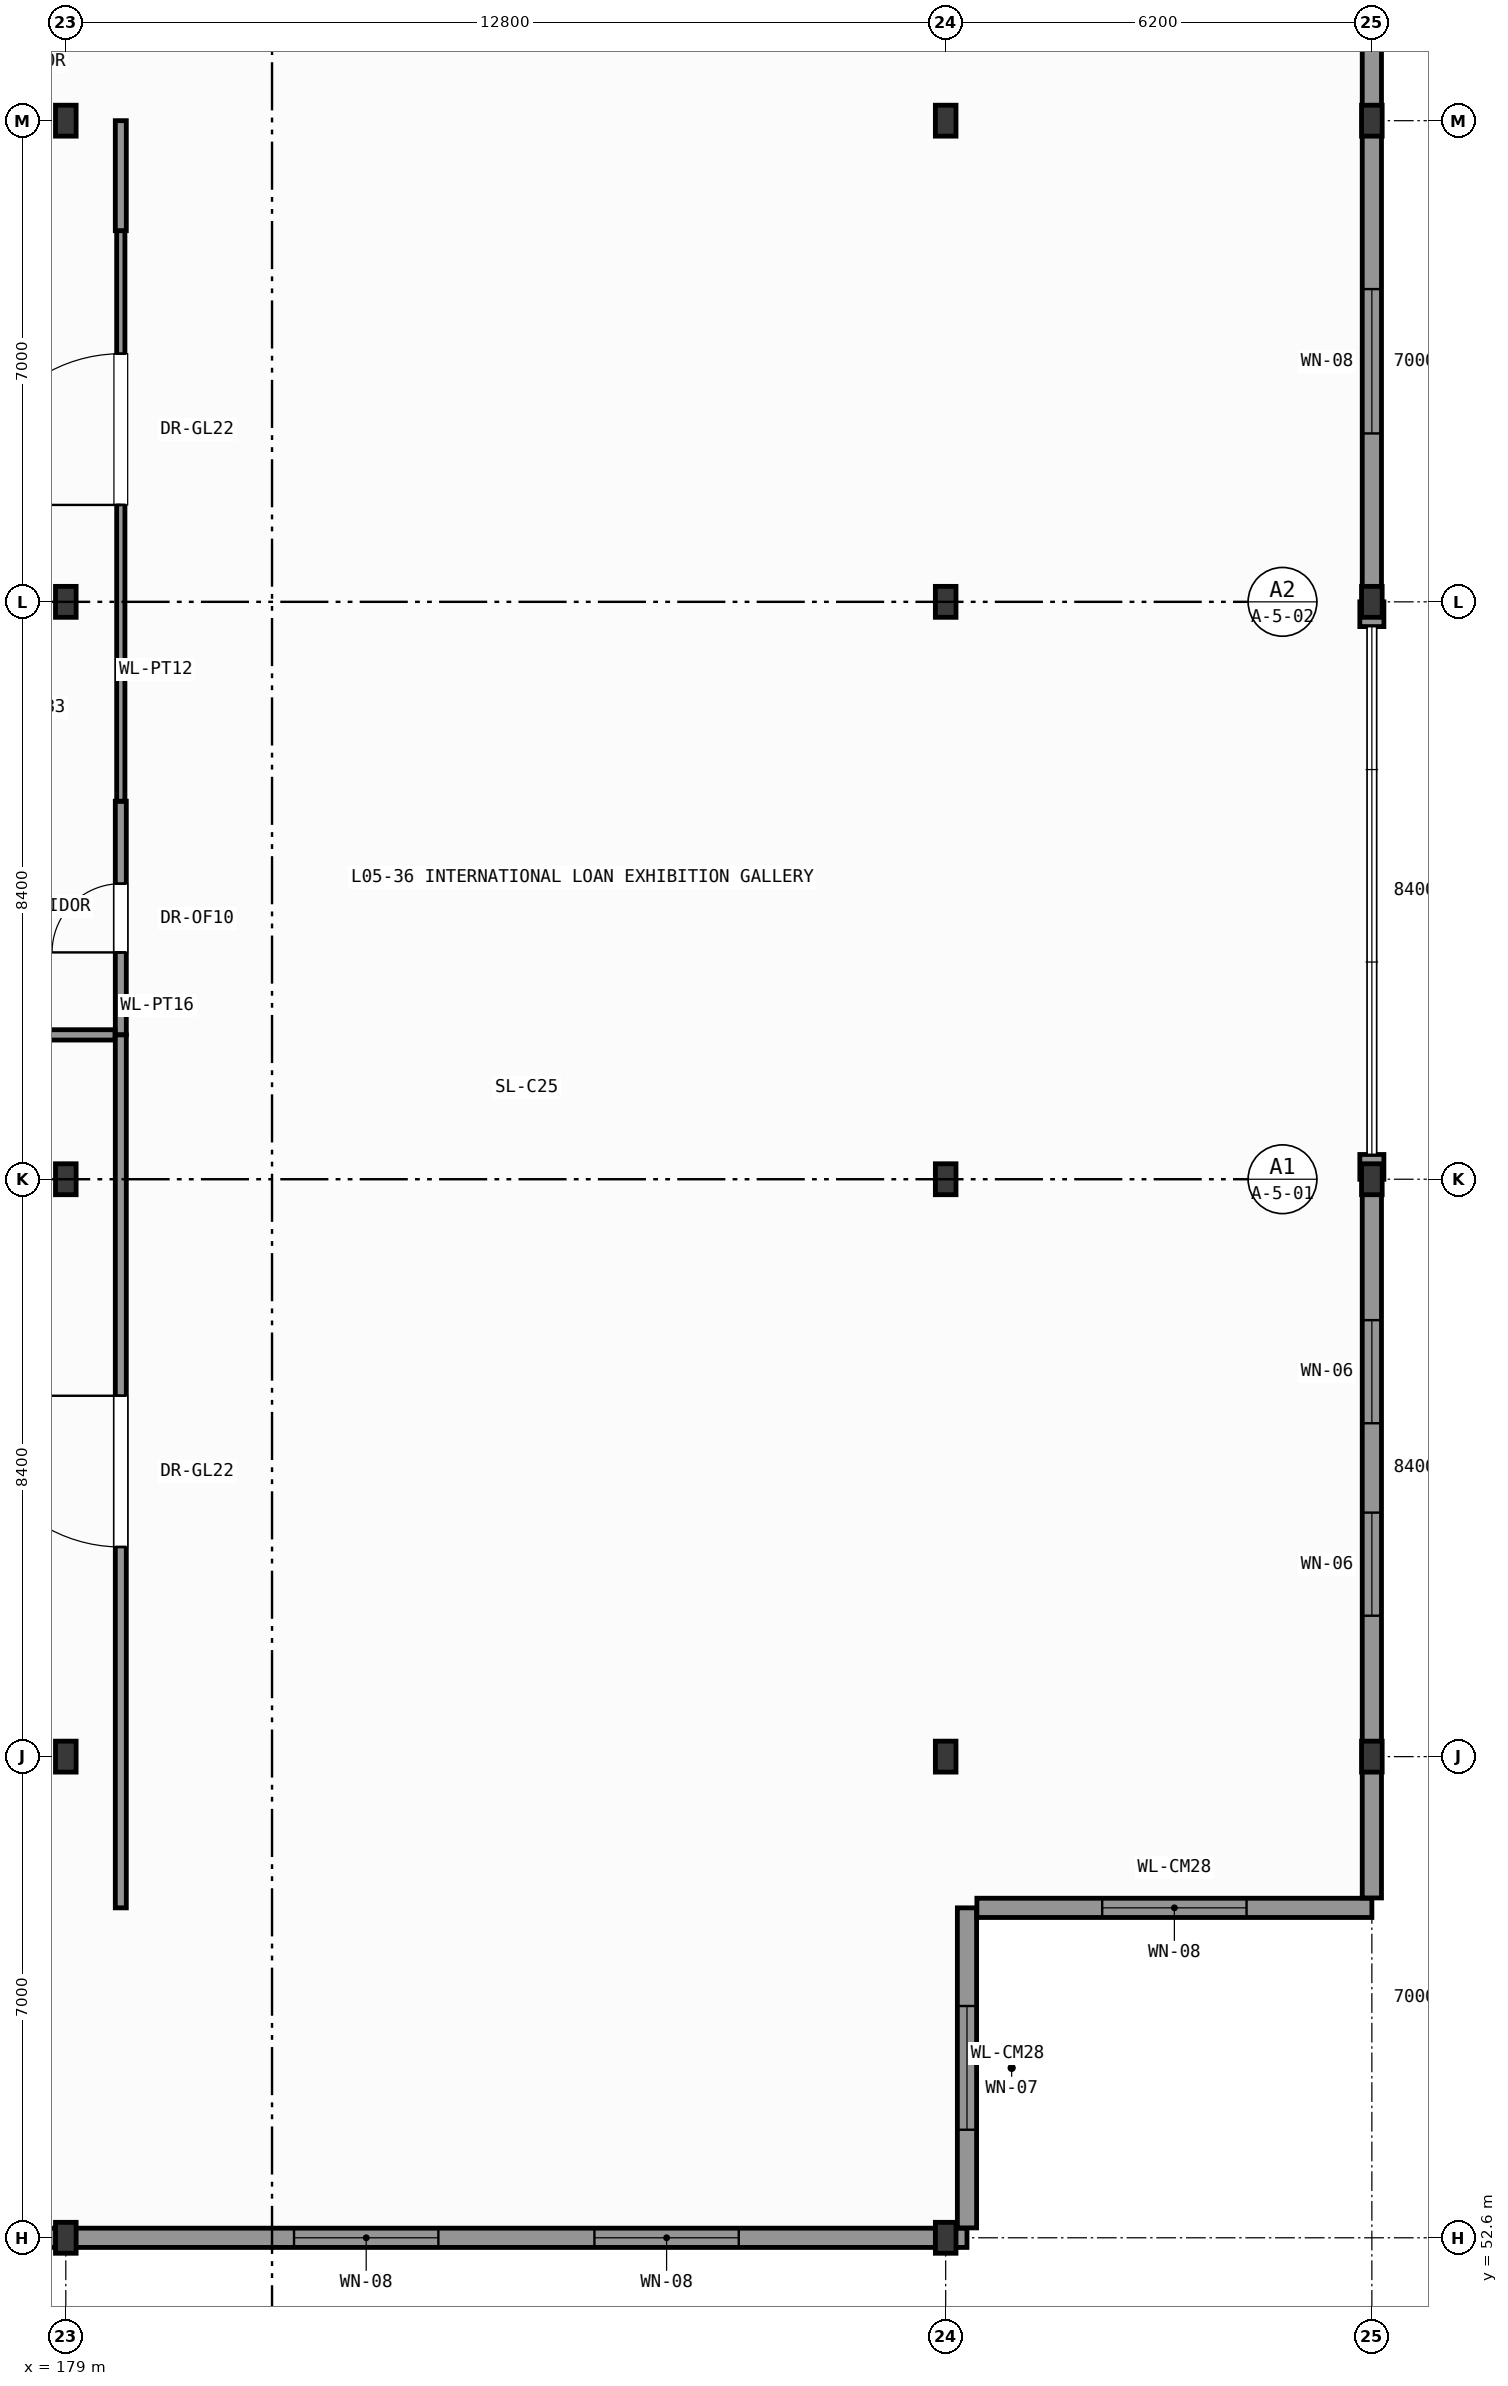
"""IFC4 building model, lengths in metres.
Left out: names, types, materials, properties, quantities, classifications, styles, units other than length and angle.
Written with IfcOpenShell. Run it as: python <this file> out.ifc"""

import sys

from ifc_helpers import new_model, si_unit, direction, frame, frame_2d, origin, origin_2d, place, context, subcontext, project, spatial, rectangle, i_section, extrude, element, fill, save


model = new_model("IFC4")
c1 = context("Model", 3, precision=1e-05, world=origin(), true_north=direction((0.0, 1.0)))
c2 = subcontext(c1, "Body", "Model", "MODEL_VIEW")
j1 = project(units=[si_unit("LENGTHUNIT", "METRE"), si_unit("PLANEANGLEUNIT", "RADIAN")], contexts=[c1])
p1 = place(None, origin())
s1 = spatial("IfcSite", under=j1, at=p1, CompositionType="ELEMENT")
p2 = place(p1, origin())
s2 = spatial("IfcBuilding", under=s1, at=p2, CompositionType="ELEMENT")
p3 = place(p2, frame((0.0, 0.0, 22.2)))
s3 = spatial("IfcBuildingStorey", under=s2, at=p3, CompositionType="ELEMENT", Elevation=22.2)
for number, where, z_axis, x_axis in (
    (1, (179.0, 52.6, 0.0), (0.0, 0.0, 1.0), (1.0, 0.0, 0.0)),
    (2, (179.0, 59.6, 0.0), (0.0, 0.0, 1.0), (1.0, 0.0, 0.0)),
    (3, (179.0, 68.0, 0.0), (0.0, 0.0, 1.0), (1.0, 0.0, 0.0)),
    (4, (179.0, 76.4, 0.0), (0.0, 0.0, 1.0), (1.0, 0.0, 0.0)),
    (5, (179.0, 83.4, 0.0), (0.0, 0.0, 1.0), (1.0, 0.0, 0.0)),
    (6, (191.8, 52.6, 0.0), (0.0, 0.0, 1.0), (1.0, 0.0, 0.0)),
    (7, (191.8, 59.6, 0.0), (0.0, 0.0, 1.0), (1.0, 0.0, 0.0)),
    (8, (191.8, 68.0, 0.0), (0.0, 0.0, 1.0), (1.0, 0.0, 0.0)),
    (9, (191.8, 76.4, 0.0), (0.0, 0.0, 1.0), (1.0, 0.0, 0.0)),
    (10, (191.8, 83.4, 0.0), (0.0, 0.0, 1.0), (1.0, 0.0, 0.0)),
    (11, (198.0, 59.6, 0.0), (0.0, 0.0, 1.0), (1.0, 0.0, 0.0)),
    (12, (198.0, 68.0, 0.0), (0.0, 0.0, 1.0), (1.0, 0.0, 0.0)),
    (13, (198.0, 76.4, 0.0), (0.0, 0.0, 1.0), (1.0, 0.0, 0.0)),
    (14, (198.0, 83.4, 0.0), (0.0, 0.0, 1.0), (1.0, 0.0, 0.0)),
):
    element("IfcColumn", number, at=place(p3, frame(where, z_axis=z_axis, x_axis=x_axis)), inside=s3, PredefinedType="COLUMN", context=c2, shape_type="SweptSolid", body=[
        extrude(i_section(OverallWidth=0.3, OverallDepth=0.45, WebThickness=0.014, FlangeThickness=0.026, FilletRadius=0.027, at=origin_2d()), origin(), (0.0, 0.0, 1.0), 4.2),
    ])
p4 = place(p3, frame((179.0, 52.6, 0.0), z_axis=(0.0, 0.0, 1.0), x_axis=(-1.0, 0.0, 0.0)))
e15 = element("IfcWall", 15, at=p4, inside=s3, PredefinedType="SOLIDWALL", context=c2, shape_type="SweptSolid", body=[
    extrude(rectangle(XDim=11.856, YDim=0.28, at=frame_2d((5.928, 0.0))), origin(), (0.0, 0.0, 1.0), 3.415),
])
p5 = place(p4, frame((3.202, 0.0, 0.95)))
e16 = element("IfcOpeningElement", 16, at=p5, cuts=e15, PredefinedType="OPENING", context=c2, shape_type="SweptSolid", body=[
    extrude(rectangle(XDim=1.5, YDim=2.06, at=frame_2d((0.75, 1.03))), frame((0.0, 0.15, 0.0), z_axis=(0.0, -1.0, 0.0), x_axis=(1.0, 0.0, 0.0)), (0.0, 0.0, 1.0), 0.3),
])
p6 = place(p4, frame((7.154, 0.0, 0.95)))
e17 = element("IfcOpeningElement", 17, at=p6, cuts=e15, PredefinedType="OPENING", context=c2, shape_type="SweptSolid", body=[
    extrude(rectangle(XDim=1.5, YDim=2.06, at=frame_2d((0.75, 1.03))), frame((0.0, 0.15, 0.0), z_axis=(0.0, -1.0, 0.0), x_axis=(1.0, 0.0, 0.0)), (0.0, 0.0, 1.0), 0.3),
])
p7 = place(p3, frame((192.11, 52.6, 0.0), z_axis=(0.0, 0.0, 1.0), x_axis=(-1.0, 0.0, 0.0)))
e18 = element("IfcWall", 18, at=p7, inside=s3, PredefinedType="SOLIDWALL", context=c2, shape_type="SweptSolid", body=[
    extrude(rectangle(XDim=13.11, YDim=0.28, at=frame_2d((6.555, 0.0))), origin(), (0.0, 0.0, 1.0), 3.415),
])
p8 = place(p7, frame((3.32, 0.0, 0.95)))
e19 = element("IfcOpeningElement", 19, at=p8, cuts=e18, PredefinedType="OPENING", context=c2, shape_type="SweptSolid", body=[
    extrude(rectangle(XDim=2.1, YDim=2.06, at=frame_2d((1.05, 1.03))), frame((0.0, 0.15, 0.0), z_axis=(0.0, -1.0, 0.0), x_axis=(1.0, 0.0, 0.0)), (0.0, 0.0, 1.0), 0.3),
])
p9 = place(p7, frame((7.69, 0.0, 0.95)))
e20 = element("IfcOpeningElement", 20, at=p9, cuts=e18, PredefinedType="OPENING", context=c2, shape_type="SweptSolid", body=[
    extrude(rectangle(XDim=2.1, YDim=2.06, at=frame_2d((1.05, 1.03))), frame((0.0, 0.15, 0.0), z_axis=(0.0, -1.0, 0.0), x_axis=(1.0, 0.0, 0.0)), (0.0, 0.0, 1.0), 0.3),
])
p10 = place(p3, frame((192.11, 57.4, 0.0), z_axis=(0.0, 0.0, 1.0), x_axis=(0.0, -1.0, 0.0)))
e21 = element("IfcWall", 21, at=p10, inside=s3, PredefinedType="SOLIDWALL", context=c2, shape_type="SweptSolid", body=[
    extrude(rectangle(XDim=4.656, YDim=0.28, at=frame_2d((2.328, 0.0))), origin(), (0.0, 0.0, 1.0), 3.675),
])
p11 = place(p10, frame((1.428, 0.0, 0.95)))
e22 = element("IfcOpeningElement", 22, at=p11, cuts=e21, PredefinedType="OPENING", context=c2, shape_type="SweptSolid", body=[
    extrude(rectangle(XDim=1.8, YDim=2.33, at=frame_2d((0.9, 1.165))), frame((0.0, 0.15, 0.0), z_axis=(0.0, -1.0, 0.0), x_axis=(1.0, 0.0, 0.0)), (0.0, 0.0, 1.0), 0.3),
])
p12 = place(p3, frame((198.0, 57.4, 0.0), z_axis=(0.0, 0.0, 1.0), x_axis=(-1.0, 0.0, 0.0)))
e23 = element("IfcWall", 23, at=p12, inside=s3, PredefinedType="SOLIDWALL", context=c2, shape_type="SweptSolid", body=[
    extrude(rectangle(XDim=5.746, YDim=0.28, at=frame_2d((2.873, 0.0))), origin(), (0.0, 0.0, 1.0), 3.98),
])
p13 = place(p12, frame((1.823, 0.0, 0.95)))
e24 = element("IfcOpeningElement", 24, at=p13, cuts=e23, PredefinedType="OPENING", context=c2, shape_type="SweptSolid", body=[
    extrude(rectangle(XDim=2.1, YDim=2.63, at=frame_2d((1.05, 1.315))), frame((0.0, 0.15, 0.0), z_axis=(0.0, -1.0, 0.0), x_axis=(1.0, 0.0, 0.0)), (0.0, 0.0, 1.0), 0.3),
])
p14 = place(p3, frame((198.0, 59.6, 0.0), z_axis=(0.0, 0.0, 1.0), x_axis=(0.0, -1.0, 0.0)))
e25 = element("IfcWall", 25, at=p14, inside=s3, PredefinedType="SOLIDWALL", context=c2, shape_type="SweptSolid", body=[
    extrude(rectangle(XDim=2.056, YDim=0.28, at=frame_2d((1.028, 0.0))), origin(), (0.0, 0.0, 1.0), 3.98),
])
p15 = place(p3, frame((198.0, 68.0, 0.0), z_axis=(0.0, 0.0, 1.0), x_axis=(0.0, -1.0, 0.0)))
e26 = element("IfcWall", 26, at=p15, inside=s3, PredefinedType="SOLIDWALL", context=c2, shape_type="SweptSolid", body=[
    extrude(rectangle(XDim=8.4, YDim=0.28, at=frame_2d((4.2, 0.0))), origin(), (0.0, 0.0, 1.0), 3.525),
])
p16 = place(p15, frame((2.05, 0.0, 0.95)))
e27 = element("IfcOpeningElement", 27, at=p16, cuts=e26, PredefinedType="OPENING", context=c2, shape_type="SweptSolid", body=[
    extrude(rectangle(XDim=1.5, YDim=2.18, at=frame_2d((0.75, 1.09))), frame((0.0, 0.15, 0.0), z_axis=(0.0, -1.0, 0.0), x_axis=(1.0, 0.0, 0.0)), (0.0, 0.0, 1.0), 0.3),
])
p17 = place(p15, frame((4.85, 0.0, 0.95)))
e28 = element("IfcOpeningElement", 28, at=p17, cuts=e26, PredefinedType="OPENING", context=c2, shape_type="SweptSolid", body=[
    extrude(rectangle(XDim=1.5, YDim=2.18, at=frame_2d((0.75, 1.09))), frame((0.0, 0.15, 0.0), z_axis=(0.0, -1.0, 0.0), x_axis=(1.0, 0.0, 0.0)), (0.0, 0.0, 1.0), 0.3),
])
p18 = place(p3, frame((198.0, 68.0, 0.0), z_axis=(0.0, 0.0, 1.0), x_axis=(0.0, 1.0, 0.0)))
e29 = element("IfcWall", 29, at=p18, inside=s3, PredefinedType="SOLIDWALL", context=c2, shape_type="SweptSolid", body=[
    extrude(rectangle(XDim=0.36, YDim=0.35, at=frame_2d((0.18, 0.0))), origin(), (0.0, 0.0, 1.0), 3.525),
])
p19 = place(p3, frame((198.0, 76.04, 0.0), z_axis=(0.0, 0.0, 1.0), x_axis=(0.0, 1.0, 0.0)))
e30 = element("IfcWall", 30, at=p19, inside=s3, PredefinedType="SOLIDWALL", context=c2, shape_type="SweptSolid", body=[
    extrude(rectangle(XDim=0.36, YDim=0.35, at=frame_2d((0.18, 0.0))), origin(), (0.0, 0.0, 1.0), 3.525),
])
p20 = place(p3, frame((198.0, 83.4, 0.0), z_axis=(0.0, 0.0, 1.0), x_axis=(0.0, -1.0, 0.0)))
e31 = element("IfcWall", 31, at=p20, inside=s3, PredefinedType="SOLIDWALL", context=c2, shape_type="SweptSolid", body=[
    extrude(rectangle(XDim=7.0, YDim=0.28, at=frame_2d((3.5, 0.0))), origin(), (0.0, 0.0, 1.0), 3.675),
])
p21 = place(p20, frame((2.45, 0.0, 0.95)))
e32 = element("IfcOpeningElement", 32, at=p21, cuts=e31, PredefinedType="OPENING", context=c2, shape_type="SweptSolid", body=[
    extrude(rectangle(XDim=2.1, YDim=2.33, at=frame_2d((1.05, 1.165))), frame((0.0, 0.15, 0.0), z_axis=(0.0, -1.0, 0.0), x_axis=(1.0, 0.0, 0.0)), (0.0, 0.0, 1.0), 0.3),
])
p22 = place(p3, frame((198.0, 90.4, 0.0), z_axis=(0.0, 0.0, 1.0), x_axis=(0.0, -1.0, 0.0)))
e33 = element("IfcWall", 33, at=p22, inside=s3, PredefinedType="SOLIDWALL", context=c2, shape_type="SweptSolid", body=[
    extrude(rectangle(XDim=7.0, YDim=0.28, at=frame_2d((3.5, 0.0))), origin(), (0.0, 0.0, 1.0), 3.675),
])
p23 = place(p22, frame((1.583, 0.0, 0.95)))
e34 = element("IfcOpeningElement", 34, at=p23, cuts=e33, PredefinedType="OPENING", context=c2, shape_type="SweptSolid", body=[
    extrude(rectangle(XDim=1.5, YDim=2.33, at=frame_2d((0.75, 1.165))), frame((0.0, 0.15, 0.0), z_axis=(0.0, -1.0, 0.0), x_axis=(1.0, 0.0, 0.0)), (0.0, 0.0, 1.0), 0.3),
])
p24 = place(p22, frame((3.917, 0.0, 0.95)))
e35 = element("IfcOpeningElement", 35, at=p24, cuts=e33, PredefinedType="OPENING", context=c2, shape_type="SweptSolid", body=[
    extrude(rectangle(XDim=1.5, YDim=2.33, at=frame_2d((0.75, 1.165))), frame((0.0, 0.15, 0.0), z_axis=(0.0, -1.0, 0.0), x_axis=(1.0, 0.0, 0.0)), (0.0, 0.0, 1.0), 0.3),
])
p25 = place(p3, frame((179.8, 70.1, 0.0), z_axis=(0.0, 0.0, 1.0), x_axis=(0.0, 1.0, 0.0)))
e36 = element("IfcWall", 36, at=p25, inside=s3, PredefinedType="PARTITIONING", context=c2, shape_type="SweptSolid", body=[
    extrude(rectangle(XDim=3.4, YDim=0.16, at=frame_2d((1.7, 0.0))), origin(), (0.0, 0.0, 1.0), 3.98),
])
p26 = place(p25, frame((1.2, 0.0, 0.0)))
e37 = element("IfcOpeningElement", 37, at=p26, cuts=e36, PredefinedType="OPENING", context=c2, shape_type="SweptSolid", body=[
    extrude(rectangle(XDim=1.0, YDim=2.15, at=frame_2d((0.5, 1.075))), frame((0.0, 0.09, 0.0), z_axis=(0.0, -1.0, 0.0), x_axis=(1.0, 0.0, 0.0)), (0.0, 0.0, 1.0), 0.18),
])
p27 = place(p3, frame((170.464, 70.1, 0.0), z_axis=(0.0, 0.0, 1.0), x_axis=(1.0, 0.0, 0.0)))
e38 = element("IfcWall", 38, at=p27, inside=s3, PredefinedType="PARTITIONING", context=c2, shape_type="SweptSolid", body=[
    extrude(rectangle(XDim=9.252, YDim=0.15, at=frame_2d((4.626, 0.0))), origin(), (0.0, 0.0, 1.0), 3.98),
])
p28 = place(p27, frame((3.526, 0.0, 0.0)))
e39 = element("IfcOpeningElement", 39, at=p28, cuts=e38, PredefinedType="OPENING", context=c2, shape_type="SweptSolid", body=[
    extrude(rectangle(XDim=2.2, YDim=2.6, at=frame_2d((1.1, 1.3))), frame((0.0, 0.085, 0.0), z_axis=(0.0, -1.0, 0.0), x_axis=(1.0, 0.0, 0.0)), (0.0, 0.0, 1.0), 0.17),
])
p29 = place(p3, frame((179.8, 73.5, 0.0), z_axis=(0.0, 0.0, 1.0), x_axis=(0.0, 1.0, 0.0)))
e40 = element("IfcWall", 40, at=p29, inside=s3, PredefinedType="PARTITIONING", context=c2, shape_type="SweptSolid", body=[
    extrude(rectangle(XDim=8.3, YDim=0.12, at=frame_2d((4.15, 0.0))), origin(), (0.0, 0.0, 1.0), 3.98),
])
p30 = place(p29, frame((4.31, 0.0, 0.0)))
e41 = element("IfcOpeningElement", 41, at=p30, cuts=e40, PredefinedType="OPENING", context=c2, shape_type="SweptSolid", body=[
    extrude(rectangle(XDim=2.2, YDim=2.6, at=frame_2d((1.1, 1.3))), frame((0.0, 0.07, 0.0), z_axis=(0.0, -1.0, 0.0), x_axis=(1.0, 0.0, 0.0)), (0.0, 0.0, 1.0), 0.14),
])
p31 = place(p3, frame((179.8, 81.8, 0.0), z_axis=(0.0, 0.0, 1.0), x_axis=(0.0, 1.0, 0.0)))
e42 = element("IfcWall", 42, at=p31, inside=s3, PredefinedType="PARTITIONING", context=c2, shape_type="SweptSolid", body=[
    extrude(rectangle(XDim=1.6, YDim=0.16, at=frame_2d((0.8, 0.0))), origin(), (0.0, 0.0, 1.0), 3.98),
])
p32 = place(p3, frame((179.8, 57.4, 0.0), z_axis=(0.0, 0.0, 1.0), x_axis=(0.0, 1.0, 0.0)))
e43 = element("IfcWall", 43, at=p32, inside=s3, PredefinedType="PARTITIONING", context=c2, shape_type="SweptSolid", body=[
    extrude(rectangle(XDim=12.7, YDim=0.16, at=frame_2d((6.35, 0.0))), origin(), (0.0, 0.0, 1.0), 3.98),
])
p33 = place(p32, frame((5.25, 0.0, 0.0)))
e44 = element("IfcOpeningElement", 44, at=p33, cuts=e43, PredefinedType="OPENING", context=c2, shape_type="SweptSolid", body=[
    extrude(rectangle(XDim=2.2, YDim=2.6, at=frame_2d((1.1, 1.3))), frame((0.0, 0.09, 0.0), z_axis=(0.0, -1.0, 0.0), x_axis=(1.0, 0.0, 0.0)), (0.0, 0.0, 1.0), 0.18),
])
p34 = place(p8, origin())
e45 = element("IfcWindow", 45, at=p34, inside=s3, PartitioningType="SINGLE_PANEL", PredefinedType="WINDOW", context=c2, shape_type="SweptSolid", body=[
    extrude(rectangle(XDim=2.1, YDim=2.06, at=frame_2d((1.05, 1.03))), frame((0.0, 0.03, 0.0), z_axis=(0.0, -1.0, 0.0), x_axis=(1.0, 0.0, 0.0)), (0.0, 0.0, 1.0), 0.06),
])
fill(e19, e45)
p35 = place(p9, origin())
e46 = element("IfcWindow", 46, at=p35, inside=s3, PartitioningType="SINGLE_PANEL", PredefinedType="WINDOW", context=c2, shape_type="SweptSolid", body=[
    extrude(rectangle(XDim=2.1, YDim=2.06, at=frame_2d((1.05, 1.03))), frame((0.0, 0.03, 0.0), z_axis=(0.0, -1.0, 0.0), x_axis=(1.0, 0.0, 0.0)), (0.0, 0.0, 1.0), 0.06),
])
fill(e20, e46)
p36 = place(p11, origin())
e47 = element("IfcWindow", 47, at=p36, inside=s3, PartitioningType="SINGLE_PANEL", PredefinedType="WINDOW", context=c2, shape_type="SweptSolid", body=[
    extrude(rectangle(XDim=1.8, YDim=2.33, at=frame_2d((0.9, 1.165))), frame((0.0, 0.03, 0.0), z_axis=(0.0, -1.0, 0.0), x_axis=(1.0, 0.0, 0.0)), (0.0, 0.0, 1.0), 0.06),
])
fill(e22, e47)
p37 = place(p13, origin())
e48 = element("IfcWindow", 48, at=p37, inside=s3, PartitioningType="SINGLE_PANEL", PredefinedType="WINDOW", context=c2, shape_type="SweptSolid", body=[
    extrude(rectangle(XDim=2.1, YDim=2.63, at=frame_2d((1.05, 1.315))), frame((0.0, 0.03, 0.0), z_axis=(0.0, -1.0, 0.0), x_axis=(1.0, 0.0, 0.0)), (0.0, 0.0, 1.0), 0.06),
])
fill(e24, e48)
p38 = place(p16, origin())
e49 = element("IfcWindow", 49, at=p38, inside=s3, PartitioningType="SINGLE_PANEL", PredefinedType="WINDOW", context=c2, shape_type="SweptSolid", body=[
    extrude(rectangle(XDim=1.5, YDim=2.18, at=frame_2d((0.75, 1.09))), frame((0.0, 0.03, 0.0), z_axis=(0.0, -1.0, 0.0), x_axis=(1.0, 0.0, 0.0)), (0.0, 0.0, 1.0), 0.06),
])
fill(e27, e49)
p39 = place(p17, origin())
e50 = element("IfcWindow", 50, at=p39, inside=s3, PartitioningType="SINGLE_PANEL", PredefinedType="WINDOW", context=c2, shape_type="SweptSolid", body=[
    extrude(rectangle(XDim=1.5, YDim=2.18, at=frame_2d((0.75, 1.09))), frame((0.0, 0.03, 0.0), z_axis=(0.0, -1.0, 0.0), x_axis=(1.0, 0.0, 0.0)), (0.0, 0.0, 1.0), 0.06),
])
fill(e28, e50)
p40 = place(p21, origin())
e51 = element("IfcWindow", 51, at=p40, inside=s3, PartitioningType="SINGLE_PANEL", PredefinedType="WINDOW", context=c2, shape_type="SweptSolid", body=[
    extrude(rectangle(XDim=2.1, YDim=2.33, at=frame_2d((1.05, 1.165))), frame((0.0, 0.03, 0.0), z_axis=(0.0, -1.0, 0.0), x_axis=(1.0, 0.0, 0.0)), (0.0, 0.0, 1.0), 0.06),
])
fill(e32, e51)
p41 = place(p26, origin())
e52 = element("IfcDoor", 52, at=p41, inside=s3, OperationType="SINGLE_SWING_LEFT", PredefinedType="DOOR", context=c2, shape_type="SweptSolid", body=[
    extrude(rectangle(XDim=1.0, YDim=2.15, at=frame_2d((0.5, 1.075))), frame((0.0, 0.025, 0.0), z_axis=(0.0, -1.0, 0.0), x_axis=(1.0, 0.0, 0.0)), (0.0, 0.0, 1.0), 0.05),
])
fill(e37, e52)
p42 = place(p30, origin())
e53 = element("IfcDoor", 53, at=p42, inside=s3, OperationType="SINGLE_SWING_LEFT", PredefinedType="DOOR", context=c2, shape_type="SweptSolid", body=[
    extrude(rectangle(XDim=2.2, YDim=2.6, at=frame_2d((1.1, 1.3))), frame((0.0, 0.025, 0.0), z_axis=(0.0, -1.0, 0.0), x_axis=(1.0, 0.0, 0.0)), (0.0, 0.0, 1.0), 0.05),
])
fill(e41, e53)
p43 = place(p33, origin())
e54 = element("IfcDoor", 54, at=p43, inside=s3, OperationType="SINGLE_SWING_RIGHT", PredefinedType="DOOR", context=c2, shape_type="SweptSolid", body=[
    extrude(rectangle(XDim=2.2, YDim=2.6, at=frame_2d((1.1, 1.3))), frame((0.0, 0.025, 0.0), z_axis=(0.0, -1.0, 0.0), x_axis=(1.0, 0.0, 0.0)), (0.0, 0.0, 1.0), 0.05),
])
fill(e44, e54)
save(model, sys.argv[1])
